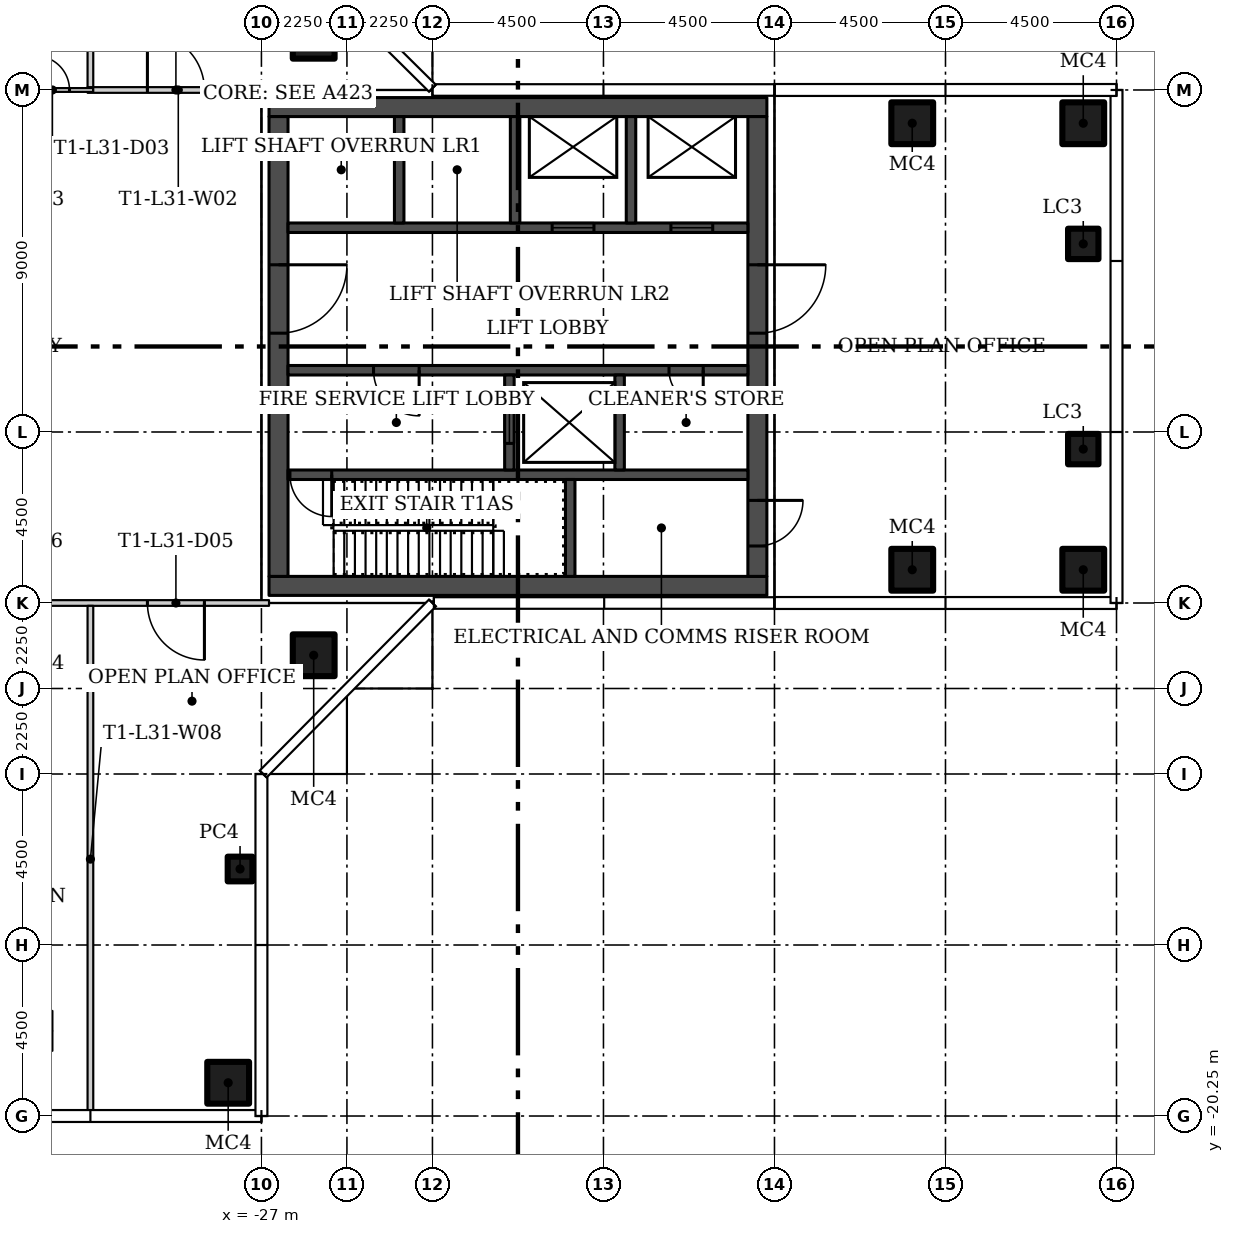
"""IFC4 building model, lengths in metres.
Left out: names, types, materials, properties, quantities, classifications, styles, units other than length and angle.
Written with IfcOpenShell. Run it as: python <this file> out.ifc"""

import sys

from ifc_helpers import new_model, si_unit, direction, frame, frame_2d, origin, origin_2d, place, context, subcontext, project, spatial, rectangle, hollow_rectangle, extrude, element, fill, save


model = new_model("IFC4")
c1 = context("Model", 3, precision=1e-05, world=origin(), true_north=direction((0.0, 1.0)))
c2 = subcontext(c1, "Body", "Model", "MODEL_VIEW")
j1 = project(units=[si_unit("LENGTHUNIT", "METRE"), si_unit("PLANEANGLEUNIT", "RADIAN")], contexts=[c1])
p1 = place(None, origin())
s1 = spatial("IfcSite", under=j1, at=p1, CompositionType="ELEMENT")
p2 = place(p1, origin())
s2 = spatial("IfcBuilding", under=s1, at=p2, CompositionType="ELEMENT")
p3 = place(p2, frame((0.0, 0.0, 133.5)))
s3 = spatial("IfcBuildingStorey", under=s2, at=p3, CompositionType="ELEMENT", Elevation=133.5)
for number, where in (
    (1, (-25.625, 8.125, 0.0)),
    (2, (-25.625, -8.125, 0.0)),
    (3, (-9.875, -5.875, 0.0)),
    (4, (-5.375, -5.875, 0.0)),
    (5, (-9.875, 5.875, 0.0)),
    (6, (-5.375, 5.875, 0.0)),
):
    element("IfcColumn", number, at=place(p3, frame(where)), inside=s3, PredefinedType="COLUMN", context=c2, shape_type="SweptSolid", body=[
        extrude(hollow_rectangle(XDim=1.1, YDim=1.1, WallThickness=0.04, at=origin_2d()), origin(), (0.0, 0.0, 1.0), 5.05),
    ])
p4 = place(p3, frame((-27.562, -13.75, 0.0)))
e7 = element("IfcColumn", 7, at=p4, inside=s3, PredefinedType="COLUMN", context=c2, shape_type="SweptSolid", body=[
    extrude(hollow_rectangle(XDim=0.65, YDim=0.65, WallThickness=0.02, at=origin_2d()), origin(), (0.0, 0.0, 1.0), 5.05),
])
p5 = place(p3, frame((-27.875, -19.375, 0.0)))
e8 = element("IfcColumn", 8, at=p5, inside=s3, PredefinedType="COLUMN", context=c2, shape_type="SweptSolid", body=[
    extrude(hollow_rectangle(XDim=1.1, YDim=1.1, WallThickness=0.04, at=origin_2d()), origin(), (0.0, 0.0, 1.0), 5.05),
])
for number, where in (
    (9, (-5.375, -2.7, 0.0)),
    (10, (-5.375, 2.7, 0.0)),
):
    element("IfcColumn", number, at=place(p3, frame(where)), inside=s3, PredefinedType="COLUMN", context=c2, shape_type="SweptSolid", body=[
        extrude(hollow_rectangle(XDim=0.8, YDim=0.8, WallThickness=0.03, at=origin_2d()), origin(), (0.0, 0.0, 1.0), 5.05),
    ])
p6 = place(p3, frame((-31.575, 6.75, 0.0)))
e11 = element("IfcWall", 11, at=p6, inside=s3, PredefinedType="PARTITIONING", context=c2, shape_type="SweptSolid", body=[
    extrude(rectangle(XDim=4.775, YDim=0.15, at=frame_2d((2.387, 0.0))), origin(), (0.0, 0.0, 1.0), 5.05),
])
p7 = place(p6, frame((1.575, 0.0, 0.0)))
e12 = element("IfcOpeningElement", 12, at=p7, cuts=e11, PredefinedType="OPENING", context=c2, shape_type="SweptSolid", body=[
    extrude(rectangle(XDim=1.5, YDim=2.1, at=frame_2d((0.75, 1.05))), frame((0.0, 0.085, 0.0), z_axis=(0.0, -1.0, 0.0), x_axis=(1.0, 0.0, 0.0)), (0.0, 0.0, 1.0), 0.17),
])
p8 = place(p3, frame((-36.075, 6.75, 0.0)))
e13 = element("IfcWall", 13, at=p8, inside=s3, PredefinedType="PARTITIONING", context=c2, shape_type="SweptSolid", body=[
    extrude(rectangle(XDim=4.65, YDim=0.1, at=frame_2d((2.325, 0.0))), origin(), (0.0, 0.0, 1.0), 5.05),
])
p9 = place(p8, frame((0.875, 0.0, 0.0)))
e14 = element("IfcOpeningElement", 14, at=p9, cuts=e13, PredefinedType="OPENING", context=c2, shape_type="SweptSolid", body=[
    extrude(rectangle(XDim=0.9, YDim=2.1, at=frame_2d((0.45, 1.05))), frame((0.0, 0.06, 0.0), z_axis=(0.0, -1.0, 0.0), x_axis=(1.0, 0.0, 0.0)), (0.0, 0.0, 1.0), 0.12),
])
p10 = place(p8, frame((3.125, 0.0, 0.0)))
e15 = element("IfcOpeningElement", 15, at=p10, cuts=e13, PredefinedType="OPENING", context=c2, shape_type="SweptSolid", body=[
    extrude(rectangle(XDim=0.9, YDim=2.1, at=frame_2d((0.45, 1.05))), frame((0.0, 0.06, 0.0), z_axis=(0.0, -1.0, 0.0), x_axis=(1.0, 0.0, 0.0)), (0.0, 0.0, 1.0), 0.12),
])
p11 = place(p3, frame((-26.8, -6.75, 0.0), z_axis=(0.0, 0.0, 1.0), x_axis=(-1.0, 0.0, 0.0)))
e16 = element("IfcWall", 16, at=p11, inside=s3, PredefinedType="PARTITIONING", context=c2, shape_type="SweptSolid", body=[
    extrude(rectangle(XDim=13.9, YDim=0.15, at=frame_2d((6.95, 0.0))), origin(), (0.0, 0.0, 1.0), 5.05),
])
p12 = place(p11, frame((1.7, 0.0, 0.0)))
e17 = element("IfcOpeningElement", 17, at=p12, cuts=e16, PredefinedType="OPENING", context=c2, shape_type="SweptSolid", body=[
    extrude(rectangle(XDim=1.5, YDim=2.1, at=frame_2d((0.75, 1.05))), frame((0.0, 0.085, 0.0), z_axis=(0.0, -1.0, 0.0), x_axis=(1.0, 0.0, 0.0)), (0.0, 0.0, 1.0), 0.17),
])
p13 = place(p11, frame((6.2, 0.0, 0.0)))
e18 = element("IfcOpeningElement", 18, at=p13, cuts=e16, PredefinedType="OPENING", context=c2, shape_type="SweptSolid", body=[
    extrude(rectangle(XDim=1.5, YDim=2.1, at=frame_2d((0.75, 1.05))), frame((0.0, 0.085, 0.0), z_axis=(0.0, -1.0, 0.0), x_axis=(1.0, 0.0, 0.0)), (0.0, 0.0, 1.0), 0.17),
])
p14 = place(p11, frame((10.7, 0.0, 0.0)))
e19 = element("IfcOpeningElement", 19, at=p14, cuts=e16, PredefinedType="OPENING", context=c2, shape_type="SweptSolid", body=[
    extrude(rectangle(XDim=1.5, YDim=2.1, at=frame_2d((0.75, 1.05))), frame((0.0, 0.085, 0.0), z_axis=(0.0, -1.0, 0.0), x_axis=(1.0, 0.0, 0.0)), (0.0, 0.0, 1.0), 0.17),
])
p15 = place(p3, frame((-31.5, -20.155, 0.0), z_axis=(0.0, 0.0, 1.0), x_axis=(0.0, 1.0, 0.0)))
e20 = element("IfcWall", 20, at=p15, inside=s3, PredefinedType="PARTITIONING", context=c2, shape_type="SweptSolid", body=[
    extrude(rectangle(XDim=13.33, YDim=0.15, at=frame_2d((6.665, 0.0))), origin(), (0.0, 0.0, 1.0), 5.05),
])
p16 = place(p3, frame((-31.5, 6.825, 0.0), z_axis=(0.0, 0.0, 1.0), x_axis=(0.0, 1.0, 0.0)))
e21 = element("IfcWall", 21, at=p16, inside=s3, PredefinedType="PARTITIONING", context=c2, shape_type="SweptSolid", body=[
    extrude(rectangle(XDim=8.83, YDim=0.15, at=frame_2d((4.415, 0.0))), origin(), (0.0, 0.0, 1.0), 5.05),
])
for number, where in (
    (22, (-26.8, -6.3, 0.0)),
    (23, (-26.8, 6.3, 0.0)),
):
    element("IfcWall", number, at=place(p3, frame(where)), inside=s3, PredefinedType="SHEAR", context=c2, shape_type="SweptSolid", body=[
        extrude(rectangle(XDim=13.1, YDim=0.5, at=frame_2d((6.55, 0.0))), origin(), (0.0, 0.0, 1.0), 5.05),
    ])
p17 = place(p3, frame((-26.55, 6.05, 0.0), z_axis=(0.0, 0.0, 1.0), x_axis=(0.0, -1.0, 0.0)))
e24 = element("IfcWall", 24, at=p17, inside=s3, PredefinedType="SHEAR", context=c2, shape_type="SweptSolid", body=[
    extrude(rectangle(XDim=12.1, YDim=0.5, at=frame_2d((6.05, 0.0))), origin(), (0.0, 0.0, 1.0), 5.05),
])
p18 = place(p17, frame((3.9, 0.0, 0.0)))
e25 = element("IfcOpeningElement", 25, at=p18, cuts=e24, PredefinedType="OPENING", context=c2, shape_type="SweptSolid", body=[
    extrude(rectangle(XDim=1.8, YDim=2.4, at=frame_2d((0.9, 1.2))), frame((0.0, 0.26, 0.0), z_axis=(0.0, -1.0, 0.0), x_axis=(1.0, 0.0, 0.0)), (0.0, 0.0, 1.0), 0.52),
])
p19 = place(p3, frame((-13.95, 6.05, 0.0), z_axis=(0.0, 0.0, 1.0), x_axis=(0.0, -1.0, 0.0)))
e26 = element("IfcWall", 26, at=p19, inside=s3, PredefinedType="SHEAR", context=c2, shape_type="SweptSolid", body=[
    extrude(rectangle(XDim=12.1, YDim=0.5, at=frame_2d((6.05, 0.0))), origin(), (0.0, 0.0, 1.0), 5.05),
])
p20 = place(p19, frame((10.1, 0.0, 0.0)))
e27 = element("IfcOpeningElement", 27, at=p20, cuts=e26, PredefinedType="OPENING", context=c2, shape_type="SweptSolid", body=[
    extrude(rectangle(XDim=1.2, YDim=2.1, at=frame_2d((0.6, 1.05))), frame((0.0, 0.26, 0.0), z_axis=(0.0, -1.0, 0.0), x_axis=(1.0, 0.0, 0.0)), (0.0, 0.0, 1.0), 0.52),
])
p21 = place(p19, frame((3.9, 0.0, 0.0)))
e28 = element("IfcOpeningElement", 28, at=p21, cuts=e26, PredefinedType="OPENING", context=c2, shape_type="SweptSolid", body=[
    extrude(rectangle(XDim=1.8, YDim=2.4, at=frame_2d((0.9, 1.2))), frame((0.0, 0.26, 0.0), z_axis=(0.0, -1.0, 0.0), x_axis=(1.0, 0.0, 0.0)), (0.0, 0.0, 1.0), 0.52),
])
p22 = place(p3, frame((-14.2, -3.375, 0.0), z_axis=(0.0, 0.0, 1.0), x_axis=(-1.0, 0.0, 0.0)))
e29 = element("IfcWall", 29, at=p22, inside=s3, PredefinedType="SHEAR", context=c2, shape_type="SweptSolid", body=[
    extrude(rectangle(XDim=12.1, YDim=0.25, at=frame_2d((6.05, 0.0))), origin(), (0.0, 0.0, 1.0), 5.05),
])
p23 = place(p22, frame((10.95, 0.0, 0.0)))
e30 = element("IfcOpeningElement", 30, at=p23, cuts=e29, PredefinedType="OPENING", context=c2, shape_type="SweptSolid", body=[
    extrude(rectangle(XDim=1.1, YDim=2.1, at=frame_2d((0.55, 1.05))), frame((0.0, 0.135, 0.0), z_axis=(0.0, -1.0, 0.0), x_axis=(1.0, 0.0, 0.0)), (0.0, 0.0, 1.0), 0.27),
])
p24 = place(p3, frame((-18.875, -6.05, 0.0), z_axis=(0.0, 0.0, 1.0), x_axis=(0.0, 1.0, 0.0)))
e31 = element("IfcWall", 31, at=p24, inside=s3, PredefinedType="SHEAR", context=c2, shape_type="SweptSolid", body=[
    extrude(rectangle(XDim=2.55, YDim=0.25, at=frame_2d((1.275, 0.0))), origin(), (0.0, 0.0, 1.0), 5.05),
])
p25 = place(p3, frame((-14.2, -0.625, 0.0), z_axis=(0.0, 0.0, 1.0), x_axis=(-1.0, 0.0, 0.0)))
e32 = element("IfcWall", 32, at=p25, inside=s3, PredefinedType="SHEAR", context=c2, shape_type="SweptSolid", body=[
    extrude(rectangle(XDim=12.1, YDim=0.25, at=frame_2d((6.05, 0.0))), origin(), (0.0, 0.0, 1.0), 5.05),
])
p26 = place(p25, frame((8.65, 0.0, 0.0)))
e33 = element("IfcOpeningElement", 33, at=p26, cuts=e32, PredefinedType="OPENING", context=c2, shape_type="SweptSolid", body=[
    extrude(rectangle(XDim=1.2, YDim=2.1, at=frame_2d((0.6, 1.05))), frame((0.0, 0.135, 0.0), z_axis=(0.0, -1.0, 0.0), x_axis=(1.0, 0.0, 0.0)), (0.0, 0.0, 1.0), 0.27),
])
p27 = place(p25, frame((1.175, 0.0, 0.0)))
e34 = element("IfcOpeningElement", 34, at=p27, cuts=e32, PredefinedType="OPENING", context=c2, shape_type="SweptSolid", body=[
    extrude(rectangle(XDim=0.9, YDim=2.1, at=frame_2d((0.45, 1.05))), frame((0.0, 0.135, 0.0), z_axis=(0.0, -1.0, 0.0), x_axis=(1.0, 0.0, 0.0)), (0.0, 0.0, 1.0), 0.27),
])
p28 = place(p3, frame((-20.475, -3.25, 0.0), z_axis=(0.0, 0.0, 1.0), x_axis=(0.0, 1.0, 0.0)))
e35 = element("IfcWall", 35, at=p28, inside=s3, PredefinedType="SHEAR", context=c2, shape_type="SweptSolid", body=[
    extrude(rectangle(XDim=2.5, YDim=0.25, at=frame_2d((1.25, 0.0))), origin(), (0.0, 0.0, 1.0), 5.05),
])
p29 = place(p28, frame((0.7, 0.0, 0.0)))
e36 = element("IfcOpeningElement", 36, at=p29, cuts=e35, PredefinedType="OPENING", context=c2, shape_type="SweptSolid", body=[
    extrude(rectangle(XDim=1.1, YDim=2.1, at=frame_2d((0.55, 1.05))), frame((0.0, 0.135, 0.0), z_axis=(0.0, -1.0, 0.0), x_axis=(1.0, 0.0, 0.0)), (0.0, 0.0, 1.0), 0.27),
])
p30 = place(p3, frame((-17.575, -3.25, 0.0), z_axis=(0.0, 0.0, 1.0), x_axis=(0.0, 1.0, 0.0)))
e37 = element("IfcWall", 37, at=p30, inside=s3, PredefinedType="SHEAR", context=c2, shape_type="SweptSolid", body=[
    extrude(rectangle(XDim=2.5, YDim=0.25, at=frame_2d((1.25, 0.0))), origin(), (0.0, 0.0, 1.0), 5.05),
])
p31 = place(p3, frame((-26.3, 3.125, 0.0)))
e38 = element("IfcWall", 38, at=p31, inside=s3, PredefinedType="SHEAR", context=c2, shape_type="SweptSolid", body=[
    extrude(rectangle(XDim=12.1, YDim=0.25, at=frame_2d((6.05, 0.0))), origin(), (0.0, 0.0, 1.0), 5.05),
])
p32 = place(p31, frame((6.95, 0.0, 0.0)))
e39 = element("IfcOpeningElement", 39, at=p32, cuts=e38, PredefinedType="OPENING", context=c2, shape_type="SweptSolid", body=[
    extrude(rectangle(XDim=1.1, YDim=2.1, at=frame_2d((0.55, 1.05))), frame((0.0, 0.135, 0.0), z_axis=(0.0, -1.0, 0.0), x_axis=(1.0, 0.0, 0.0)), (0.0, 0.0, 1.0), 0.27),
])
p33 = place(p31, frame((10.075, 0.0, 0.0)))
e40 = element("IfcOpeningElement", 40, at=p33, cuts=e38, PredefinedType="OPENING", context=c2, shape_type="SweptSolid", body=[
    extrude(rectangle(XDim=1.1, YDim=2.1, at=frame_2d((0.55, 1.05))), frame((0.0, 0.135, 0.0), z_axis=(0.0, -1.0, 0.0), x_axis=(1.0, 0.0, 0.0)), (0.0, 0.0, 1.0), 0.27),
])
for number, where, z_axis, x_axis in (
    (41, (-23.375, 3.25, 0.0), (0.0, 0.0, 1.0), (0.0, 1.0, 0.0)),
    (42, (-20.325, 3.25, 0.0), (0.0, 0.0, 1.0), (0.0, 1.0, 0.0)),
    (43, (-17.275, 3.25, 0.0), (0.0, 0.0, 1.0), (0.0, 1.0, 0.0)),
):
    element("IfcWall", number, at=place(p3, frame(where, z_axis=z_axis, x_axis=x_axis)), inside=s3, PredefinedType="SHEAR", context=c2, shape_type="SweptSolid", body=[
        extrude(rectangle(XDim=2.8, YDim=0.25, at=frame_2d((1.4, 0.0))), origin(), (0.0, 0.0, 1.0), 5.05),
    ])
p34 = place(p10, origin())
e44 = element("IfcDoor", 44, at=p34, inside=s3, OperationType="SINGLE_SWING_LEFT", PredefinedType="DOOR", context=c2, shape_type="SweptSolid", body=[
    extrude(rectangle(XDim=0.9, YDim=2.1, at=frame_2d((0.45, 1.05))), frame((0.0, 0.025, 0.0), z_axis=(0.0, -1.0, 0.0), x_axis=(1.0, 0.0, 0.0)), (0.0, 0.0, 1.0), 0.05),
])
fill(e15, e44)
p35 = place(p7, origin())
e45 = element("IfcDoor", 45, at=p35, inside=s3, OperationType="DOUBLE_DOOR_SINGLE_SWING", PredefinedType="DOOR", context=c2, shape_type="SweptSolid", body=[
    extrude(rectangle(XDim=1.5, YDim=2.1, at=frame_2d((0.75, 1.05))), frame((0.0, 0.025, 0.0), z_axis=(0.0, -1.0, 0.0), x_axis=(1.0, 0.0, 0.0)), (0.0, 0.0, 1.0), 0.05),
])
fill(e12, e45)
p36 = place(p12, origin())
e46 = element("IfcDoor", 46, at=p36, inside=s3, OperationType="DOUBLE_DOOR_SINGLE_SWING", PredefinedType="DOOR", context=c2, shape_type="SweptSolid", body=[
    extrude(rectangle(XDim=1.5, YDim=2.1, at=frame_2d((0.75, 1.05))), frame((0.0, 0.025, 0.0), z_axis=(0.0, -1.0, 0.0), x_axis=(1.0, 0.0, 0.0)), (0.0, 0.0, 1.0), 0.05),
])
fill(e17, e46)
p37 = place(p18, origin())
e47 = element("IfcDoor", 47, at=p37, inside=s3, OperationType="DOUBLE_DOOR_SINGLE_SWING", PredefinedType="DOOR", context=c2, shape_type="SweptSolid", body=[
    extrude(rectangle(XDim=1.8, YDim=2.4, at=frame_2d((0.9, 1.2))), frame((0.0, 0.025, 0.0), z_axis=(0.0, -1.0, 0.0), x_axis=(1.0, 0.0, 0.0)), (0.0, 0.0, 1.0), 0.05),
])
fill(e25, e47)
p38 = place(p20, origin())
e48 = element("IfcDoor", 48, at=p38, inside=s3, OperationType="SINGLE_SWING_RIGHT", PredefinedType="DOOR", context=c2, shape_type="SweptSolid", body=[
    extrude(rectangle(XDim=1.2, YDim=2.1, at=frame_2d((0.6, 1.05))), frame((0.0, 0.025, 0.0), z_axis=(0.0, -1.0, 0.0), x_axis=(1.0, 0.0, 0.0)), (0.0, 0.0, 1.0), 0.05),
])
fill(e27, e48)
p39 = place(p21, origin())
e49 = element("IfcDoor", 49, at=p39, inside=s3, OperationType="DOUBLE_DOOR_SINGLE_SWING", PredefinedType="DOOR", context=c2, shape_type="SweptSolid", body=[
    extrude(rectangle(XDim=1.8, YDim=2.4, at=frame_2d((0.9, 1.2))), frame((0.0, 0.025, 0.0), z_axis=(0.0, -1.0, 0.0), x_axis=(1.0, 0.0, 0.0)), (0.0, 0.0, 1.0), 0.05),
])
fill(e28, e49)
p40 = place(p23, origin())
e50 = element("IfcDoor", 50, at=p40, inside=s3, OperationType="SINGLE_SWING_RIGHT", PredefinedType="DOOR", context=c2, shape_type="SweptSolid", body=[
    extrude(rectangle(XDim=1.1, YDim=2.1, at=frame_2d((0.55, 1.05))), frame((0.0, 0.025, 0.0), z_axis=(0.0, -1.0, 0.0), x_axis=(1.0, 0.0, 0.0)), (0.0, 0.0, 1.0), 0.05),
])
fill(e30, e50)
p41 = place(p26, origin())
e51 = element("IfcDoor", 51, at=p41, inside=s3, OperationType="SINGLE_SWING_RIGHT", PredefinedType="DOOR", context=c2, shape_type="SweptSolid", body=[
    extrude(rectangle(XDim=1.2, YDim=2.1, at=frame_2d((0.6, 1.05))), frame((0.0, 0.025, 0.0), z_axis=(0.0, -1.0, 0.0), x_axis=(1.0, 0.0, 0.0)), (0.0, 0.0, 1.0), 0.05),
])
fill(e33, e51)
p42 = place(p27, origin())
e52 = element("IfcDoor", 52, at=p42, inside=s3, OperationType="SINGLE_SWING_LEFT", PredefinedType="DOOR", context=c2, shape_type="SweptSolid", body=[
    extrude(rectangle(XDim=0.9, YDim=2.1, at=frame_2d((0.45, 1.05))), frame((0.0, 0.025, 0.0), z_axis=(0.0, -1.0, 0.0), x_axis=(1.0, 0.0, 0.0)), (0.0, 0.0, 1.0), 0.05),
])
fill(e34, e52)
p43 = place(p29, origin())
e53 = element("IfcDoor", 53, at=p43, inside=s3, OperationType="SLIDING_TO_LEFT", PredefinedType="DOOR", context=c2, shape_type="SweptSolid", body=[
    extrude(rectangle(XDim=1.1, YDim=2.1, at=frame_2d((0.55, 1.05))), frame((0.0, 0.025, 0.0), z_axis=(0.0, -1.0, 0.0), x_axis=(1.0, 0.0, 0.0)), (0.0, 0.0, 1.0), 0.05),
])
fill(e36, e53)
p44 = place(p32, origin())
e54 = element("IfcDoor", 54, at=p44, inside=s3, OperationType="SLIDING_TO_LEFT", PredefinedType="DOOR", context=c2, shape_type="SweptSolid", body=[
    extrude(rectangle(XDim=1.1, YDim=2.1, at=frame_2d((0.55, 1.05))), frame((0.0, 0.025, 0.0), z_axis=(0.0, -1.0, 0.0), x_axis=(1.0, 0.0, 0.0)), (0.0, 0.0, 1.0), 0.05),
])
fill(e39, e54)
p45 = place(p33, origin())
e55 = element("IfcDoor", 55, at=p45, inside=s3, OperationType="SLIDING_TO_LEFT", PredefinedType="DOOR", context=c2, shape_type="SweptSolid", body=[
    extrude(rectangle(XDim=1.1, YDim=2.1, at=frame_2d((0.55, 1.05))), frame((0.0, 0.025, 0.0), z_axis=(0.0, -1.0, 0.0), x_axis=(1.0, 0.0, 0.0)), (0.0, 0.0, 1.0), 0.05),
])
fill(e40, e55)
save(model, sys.argv[1])
